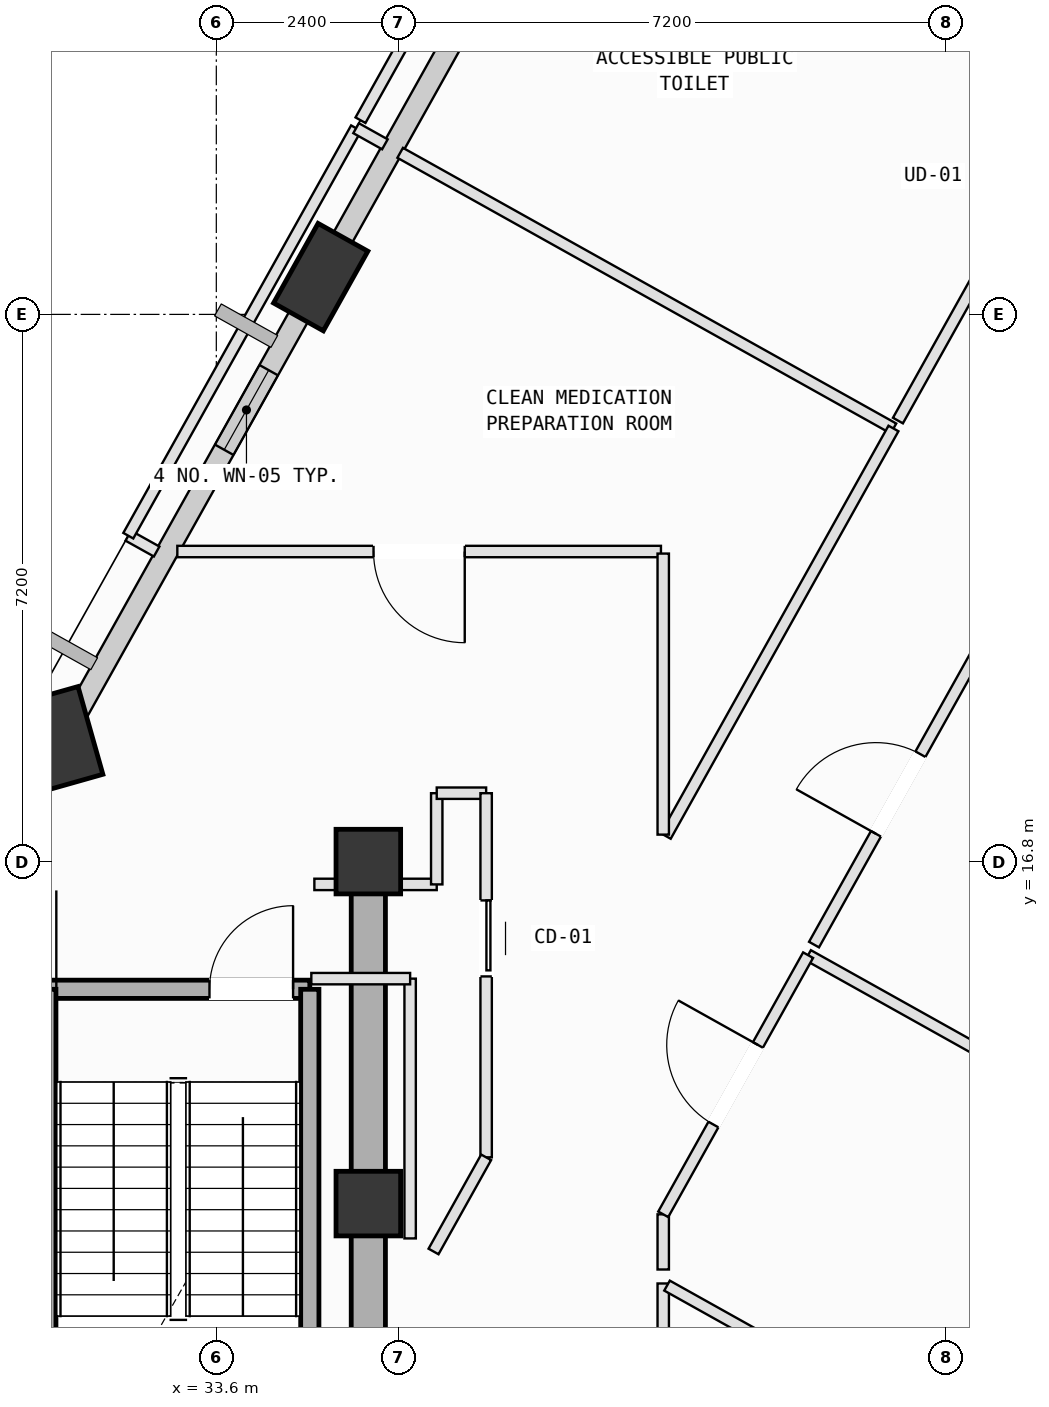
"""IFC4 building model, lengths in metres.
Left out: names, types, materials, properties, quantities, classifications, styles, units other than length and angle.
Written with IfcOpenShell. Run it as: python <this file> out.ifc"""

import sys

from ifc_helpers import new_model, si_unit, direction, frame, frame_2d, origin, origin_2d, place, context, subcontext, project, spatial, rectangle, extrude, element, fill, save


model = new_model("IFC4")
c1 = context("Model", 3, precision=1e-05, world=origin(), true_north=direction((0.0, 1.0)))
c2 = subcontext(c1, "Body", "Model", "MODEL_VIEW")
j1 = project(units=[si_unit("LENGTHUNIT", "METRE"), si_unit("PLANEANGLEUNIT", "RADIAN")], contexts=[c1])
p1 = place(None, origin())
s1 = spatial("IfcSite", under=j1, at=p1, CompositionType="ELEMENT")
p2 = place(p1, origin())
s2 = spatial("IfcBuilding", under=s1, at=p2, CompositionType="ELEMENT")
p3 = place(p2, frame((0.0, 0.0, 284.6)))
s3 = spatial("IfcBuildingStorey", under=s2, at=p3, CompositionType="ELEMENT", Elevation=284.6)
for number, where, z_axis, x_axis in (
    (1, (35.6, 12.3, 0.0), (0.0, 0.0, 1.0), (1.0, 0.0, 0.0)),
    (2, (35.6, 16.8, 0.0), (0.0, 0.0, 1.0), (1.0, 0.0, 0.0)),
):
    element("IfcColumn", number, at=place(p3, frame(where, z_axis=z_axis, x_axis=x_axis)), inside=s3, PredefinedType="COLUMN", context=c2, shape_type="SweptSolid", body=[
        extrude(rectangle(XDim=0.85, YDim=0.85, at=origin_2d()), origin(), (0.0, 0.0, 1.0), 4.0),
    ])
p4 = place(p3, frame((34.974, 24.49, 0.002), z_axis=(0.001221800679, 0.00574246319, 0.999982765511), x_axis=(-0.658837051571, -0.752268219843, 0.005124928444)))
e3 = element("IfcColumn", 3, at=p4, inside=s3, PredefinedType="COLUMN", context=c2, shape_type="SweptSolid", body=[
    extrude(rectangle(XDim=1.2, YDim=0.75, at=origin_2d()), origin(), (0.0, 0.0, 1.0), 3.996),
])
p5 = place(p3, frame((31.583, 18.424, 0.002), z_axis=(0.026503330104, -0.008183055839, 0.999615231522), x_axis=(-0.999365222964, 0.023596653309, 0.026689868551)))
e4 = element("IfcColumn", 4, at=p5, inside=s3, PredefinedType="COLUMN", context=c2, shape_type="SweptSolid", body=[
    extrude(rectangle(XDim=1.2, YDim=0.75, at=origin_2d()), origin(), (0.0, 0.0, 1.0), 3.998),
])
p6 = place(p3, frame((35.173, 24.847, 0.0), z_axis=(0.0, 0.0, 1.0), x_axis=(0.487834163492, 0.872936325817, 0.0)))
e5 = element("IfcWall", 5, at=p6, inside=s3, PredefinedType="SOLIDWALL", context=c2, shape_type="SweptSolid", body=[
    extrude(rectangle(XDim=6.409, YDim=0.28, at=frame_2d((3.205, 0.0))), origin(), (0.0, 0.0, 1.0), 3.265),
])
p7 = place(p6, frame((3.233, 0.0, 0.75)))
e6 = element("IfcOpeningElement", 6, at=p7, cuts=e5, PredefinedType="OPENING", context=c2, shape_type="SweptSolid", body=[
    extrude(rectangle(XDim=1.8, YDim=2.05, at=frame_2d((0.9, 1.025))), frame((0.0, 0.15, 0.0), z_axis=(0.0, -1.0, 0.0), x_axis=(1.0, 0.0, 0.0)), (0.0, 0.0, 1.0), 0.3),
])
p8 = place(p3, frame((31.781, 18.778, 0.0), z_axis=(0.0, 0.0, 1.0), x_axis=(0.487859563913, 0.87292213049, 0.0)))
e7 = element("IfcWall", 7, at=p8, inside=s3, PredefinedType="SOLIDWALL", context=c2, shape_type="SweptSolid", body=[
    extrude(rectangle(XDim=6.158, YDim=0.28, at=frame_2d((3.079, 0.0))), origin(), (0.0, 0.0, 1.0), 3.265),
])
p9 = place(p8, frame((3.942, 0.0, 0.75)))
e8 = element("IfcOpeningElement", 8, at=p9, cuts=e7, PredefinedType="OPENING", context=c2, shape_type="SweptSolid", body=[
    extrude(rectangle(XDim=1.2, YDim=1.75, at=frame_2d((0.6, 0.875))), frame((0.0, 0.15, 0.0), z_axis=(0.0, -1.0, 0.0), x_axis=(1.0, 0.0, 0.0)), (0.0, 0.0, 1.0), 0.3),
])
p10 = place(p3, frame((31.37, 15.12, 0.0), z_axis=(0.0, 0.0, 1.0), x_axis=(1.0, 0.0, 0.0)))
e9 = element("IfcWall", 9, at=p10, inside=s3, PredefinedType="SOLIDWALL", context=c2, shape_type="SweptSolid", body=[
    extrude(rectangle(XDim=3.46, YDim=0.24, at=frame_2d((1.73, 0.0))), origin(), (0.0, 0.0, 1.0), 3.78),
])
p11 = place(p10, frame((2.14, 0.0, 0.0)))
e10 = element("IfcOpeningElement", 10, at=p11, cuts=e9, PredefinedType="OPENING", context=c2, shape_type="SweptSolid", body=[
    extrude(rectangle(XDim=1.1, YDim=2.15, at=frame_2d((0.55, 1.075))), frame((0.0, 0.13, 0.0), z_axis=(0.0, -1.0, 0.0), x_axis=(1.0, 0.0, 0.0)), (0.0, 0.0, 1.0), 0.26),
])
for number, where, z_axis, x_axis in (
    (11, (34.83, 15.12, 0.0), (0.0, 0.0, 1.0), (0.0, -1.0, 0.0)),
    (12, (31.37, 8.025, 0.0), (0.0, 0.0, 1.0), (0.0, 1.0, 0.0)),
):
    element("IfcWall", number, at=place(p3, frame(where, z_axis=z_axis, x_axis=x_axis)), inside=s3, PredefinedType="SOLIDWALL", context=c2, shape_type="SweptSolid", body=[
        extrude(rectangle(XDim=7.095, YDim=0.24, at=frame_2d((3.548, 0.0))), origin(), (0.0, 0.0, 1.0), 3.78),
    ])
p12 = place(p3, frame((35.6, 7.8, 0.0), z_axis=(0.0, 0.0, 1.0), x_axis=(0.0, 1.0, 0.0)))
e13 = element("IfcWall", 13, at=p12, inside=s3, PredefinedType="SHEAR", context=c2, shape_type="SweptSolid", body=[
    extrude(rectangle(XDim=9.0, YDim=0.45, at=frame_2d((4.5, 0.0))), origin(), (0.0, 0.0, 1.0), 3.78),
])
p13 = place(p3, frame((39.48, 6.048, 0.0), z_axis=(0.0, 0.0, 1.0), x_axis=(0.0, 1.0, 0.0)))
e14 = element("IfcWall", 14, at=p13, inside=s3, PredefinedType="PARTITIONING", context=c2, shape_type="SweptSolid", body=[
    extrude(rectangle(XDim=5.201, YDim=0.15, at=frame_2d((2.601, 0.0))), origin(), (0.0, 0.0, 1.0), 3.78),
])
p14 = place(p13, frame((2.0, 0.0, 0.0)))
e15 = element("IfcOpeningElement", 15, at=p14, cuts=e14, PredefinedType="OPENING", context=c2, shape_type="SweptSolid", body=[
    extrude(rectangle(XDim=1.2, YDim=2.15, at=frame_2d((0.6, 1.075))), frame((0.0, 0.085, 0.0), z_axis=(0.0, -1.0, 0.0), x_axis=(1.0, 0.0, 0.0)), (0.0, 0.0, 1.0), 0.17),
])
p15 = place(p3, frame((39.53, 11.221, 0.0), z_axis=(0.0, 0.0, 1.0), x_axis=(0.872948808253, -0.487811826598, 0.0)))
e16 = element("IfcWall", 16, at=p15, inside=s3, PredefinedType="PARTITIONING", context=c2, shape_type="SweptSolid", body=[
    extrude(rectangle(XDim=10.334, YDim=0.15, at=frame_2d((5.167, 0.0))), origin(), (0.0, 0.0, 1.0), 3.78),
])
p16 = place(p3, frame((41.386, 15.569, 0.0), z_axis=(0.0, 0.0, 1.0), x_axis=(0.872874616124, -0.487944571161, 0.0)))
e17 = element("IfcWall", 17, at=p16, inside=s3, PredefinedType="PARTITIONING", context=c2, shape_type="SweptSolid", body=[
    extrude(rectangle(XDim=10.835, YDim=0.15, at=frame_2d((5.418, 0.0))), origin(), (0.0, 0.0, 1.0), 3.78),
])
p17 = place(p3, frame((39.48, 11.433, 0.0), z_axis=(0.0, 0.0, 1.0), x_axis=(0.0, 1.0, 0.0)))
e18 = element("IfcWall", 18, at=p17, inside=s3, PredefinedType="PARTITIONING", context=c2, shape_type="SweptSolid", body=[
    extrude(rectangle(XDim=0.726, YDim=0.15, at=frame_2d((0.363, 0.0))), origin(), (0.0, 0.0, 1.0), 3.315),
])
p18 = place(p3, frame((39.48, 12.159, 0.0), z_axis=(0.0, 0.0, 1.0), x_axis=(0.487885785895, 0.872907475006, 0.0)))
e19 = element("IfcWall", 19, at=p18, inside=s3, PredefinedType="PARTITIONING", context=c2, shape_type="SweptSolid", body=[
    extrude(rectangle(XDim=3.907, YDim=0.15, at=frame_2d((1.953, 0.0))), origin(), (0.0, 0.0, 1.0), 3.78),
])
p19 = place(p18, frame((1.353, 0.0, 0.0)))
e20 = element("IfcOpeningElement", 20, at=p19, cuts=e19, PredefinedType="OPENING", context=c2, shape_type="SweptSolid", body=[
    extrude(rectangle(XDim=1.2, YDim=2.15, at=frame_2d((0.6, 1.075))), frame((0.0, 0.085, 0.0), z_axis=(0.0, -1.0, 0.0), x_axis=(1.0, 0.0, 0.0)), (0.0, 0.0, 1.0), 0.17),
])
p20 = place(p3, frame((41.464, 15.708, 0.0), z_axis=(0.0, 0.0, 1.0), x_axis=(0.487869568795, 0.872916538876, 0.0)))
e21 = element("IfcWall", 21, at=p20, inside=s3, PredefinedType="PARTITIONING", context=c2, shape_type="SweptSolid", body=[
    extrude(rectangle(XDim=4.54, YDim=0.15, at=frame_2d((2.27, 0.0))), origin(), (0.0, 0.0, 1.0), 3.78),
])
p21 = place(p20, frame((1.67, 0.0, 0.0)))
e22 = element("IfcOpeningElement", 22, at=p21, cuts=e21, PredefinedType="OPENING", context=c2, shape_type="SweptSolid", body=[
    extrude(rectangle(XDim=1.2, YDim=2.15, at=frame_2d((0.6, 1.075))), frame((0.0, 0.085, 0.0), z_axis=(0.0, -1.0, 0.0), x_axis=(1.0, 0.0, 0.0)), (0.0, 0.0, 1.0), 0.17),
])
p22 = place(p3, frame((34.89, 16.5, 0.0), z_axis=(0.0, 0.0, 1.0), x_axis=(1.0, 0.0, 0.0)))
e23 = element("IfcWall", 23, at=p22, inside=s3, PredefinedType="PARTITIONING", context=c2, shape_type="SweptSolid", body=[
    extrude(rectangle(XDim=1.61, YDim=0.15, at=frame_2d((0.805, 0.0))), origin(), (0.0, 0.0, 1.0), 3.165),
])
p23 = place(p3, frame((36.5, 16.5, 0.0), z_axis=(0.0, 0.0, 1.0), x_axis=(0.0, 1.0, 0.0)))
e24 = element("IfcWall", 24, at=p23, inside=s3, PredefinedType="PARTITIONING", context=c2, shape_type="SweptSolid", body=[
    extrude(rectangle(XDim=1.2, YDim=0.15, at=frame_2d((0.6, 0.0))), origin(), (0.0, 0.0, 1.0), 3.78),
])
p24 = place(p3, frame((36.5, 17.7, 0.0), z_axis=(0.0, 0.0, 1.0), x_axis=(1.0, 0.0, 0.0)))
e25 = element("IfcWall", 25, at=p24, inside=s3, PredefinedType="PARTITIONING", context=c2, shape_type="SweptSolid", body=[
    extrude(rectangle(XDim=0.65, YDim=0.15, at=frame_2d((0.325, 0.0))), origin(), (0.0, 0.0, 1.0), 3.78),
])
p25 = place(p3, frame((37.15, 17.7, 0.0), z_axis=(0.0, 0.0, 1.0), x_axis=(0.0, -1.0, 0.0)))
e26 = element("IfcWall", 26, at=p25, inside=s3, PredefinedType="PARTITIONING", context=c2, shape_type="SweptSolid", body=[
    extrude(rectangle(XDim=4.791, YDim=0.15, at=frame_2d((2.396, 0.0))), origin(), (0.0, 0.0, 1.0), 3.78),
])
p26 = place(p25, frame((1.411, 0.0, 0.0)))
e27 = element("IfcOpeningElement", 27, at=p26, cuts=e26, PredefinedType="OPENING", context=c2, shape_type="SweptSolid", body=[
    extrude(rectangle(XDim=1.0, YDim=2.12, at=frame_2d((0.5, 1.06))), frame((0.0, 0.085, 0.0), z_axis=(0.0, -1.0, 0.0), x_axis=(1.0, 0.0, 0.0)), (0.0, 0.0, 1.0), 0.17),
])
p27 = place(p3, frame((37.15, 12.909, 0.0), z_axis=(0.0, 0.0, 1.0), x_axis=(-0.487555283058, -0.873092117684, 0.0)))
e28 = element("IfcWall", 28, at=p27, inside=s3, PredefinedType="PARTITIONING", context=c2, shape_type="SweptSolid", body=[
    extrude(rectangle(XDim=1.419, YDim=0.15, at=frame_2d((0.709, 0.0))), origin(), (0.0, 0.0, 1.0), 3.78),
])
p28 = place(p3, frame((36.15, 11.842, 0.0), z_axis=(0.0, 0.0, 1.0), x_axis=(0.0, 1.0, 0.0)))
e29 = element("IfcWall", 29, at=p28, inside=s3, PredefinedType="PARTITIONING", context=c2, shape_type="SweptSolid", body=[
    extrude(rectangle(XDim=3.418, YDim=0.15, at=frame_2d((1.709, 0.0))), origin(), (0.0, 0.0, 1.0), 3.78),
])
p29 = place(p3, frame((36.15, 15.26, 0.0), z_axis=(0.0, 0.0, 1.0), x_axis=(-1.0, 0.0, 0.0)))
e30 = element("IfcWall", 30, at=p29, inside=s3, PredefinedType="PARTITIONING", context=c2, shape_type="SweptSolid", body=[
    extrude(rectangle(XDim=1.3, YDim=0.15, at=frame_2d((0.65, 0.0))), origin(), (0.0, 0.0, 1.0), 3.78),
])
p30 = place(p3, frame((39.45, 20.88, 0.0), z_axis=(0.0, 0.0, 1.0), x_axis=(-1.0, 0.0, 0.0)))
e31 = element("IfcWall", 31, at=p30, inside=s3, PredefinedType="PARTITIONING", context=c2, shape_type="SweptSolid", body=[
    extrude(rectangle(XDim=6.363, YDim=0.15, at=frame_2d((3.182, 0.0))), origin(), (0.0, 0.0, 1.0), 3.415),
])
p31 = place(p30, frame((2.582, 0.0, 0.0)))
e32 = element("IfcOpeningElement", 32, at=p31, cuts=e31, PredefinedType="OPENING", context=c2, shape_type="SweptSolid", body=[
    extrude(rectangle(XDim=1.2, YDim=2.15, at=frame_2d((0.6, 1.075))), frame((0.0, 0.085, 0.0), z_axis=(0.0, -1.0, 0.0), x_axis=(1.0, 0.0, 0.0)), (0.0, 0.0, 1.0), 0.17),
])
p32 = place(p3, frame((32.815, 20.88, 0.0), z_axis=(0.0, 0.0, 1.0), x_axis=(-0.873401279557, 0.48700123703, 0.0)))
e33 = element("IfcWall", 33, at=p32, inside=s3, PredefinedType="PARTITIONING", context=c2, shape_type="SweptSolid", body=[
    extrude(rectangle(XDim=0.427, YDim=0.15, at=frame_2d((0.213, 0.0))), origin(), (0.0, 0.0, 1.0), 3.78),
])
p33 = place(p3, frame((32.442, 21.088, 0.0), z_axis=(0.0, 0.0, 1.0), x_axis=(0.487898852852, 0.872900171489, 0.0)))
e34 = element("IfcWall", 34, at=p33, inside=s3, PredefinedType="PARTITIONING", context=c2, shape_type="SweptSolid", body=[
    extrude(rectangle(XDim=6.143, YDim=0.15, at=frame_2d((3.071, 0.0))), origin(), (0.0, 0.0, 1.0), 3.78),
])
p34 = place(p3, frame((35.439, 26.45, 0.0), z_axis=(0.0, 0.0, 1.0), x_axis=(0.872908280471, -0.487884344784, 0.0)))
e35 = element("IfcWall", 35, at=p34, inside=s3, PredefinedType="PARTITIONING", context=c2, shape_type="SweptSolid", body=[
    extrude(rectangle(XDim=0.434, YDim=0.15, at=frame_2d((0.217, 0.0))), origin(), (0.0, 0.0, 1.0), 3.78),
])
p35 = place(p3, frame((36.019, 26.126, 0.0), z_axis=(0.0, 0.0, 1.0), x_axis=(0.872932377171, -0.487841229179, 0.0)))
e36 = element("IfcWall", 36, at=p35, inside=s3, PredefinedType="PARTITIONING", context=c2, shape_type="SweptSolid", body=[
    extrude(rectangle(XDim=7.435, YDim=0.15, at=frame_2d((3.717, 0.0))), origin(), (0.0, 0.0, 1.0), 3.78),
])
p36 = place(p3, frame((42.509, 22.499, 0.0), z_axis=(0.0, 0.0, 1.0), x_axis=(-0.487777705872, -0.872967874354, 0.0)))
e37 = element("IfcWall", 37, at=p36, inside=s3, PredefinedType="PARTITIONING", context=c2, shape_type="SweptSolid", body=[
    extrude(rectangle(XDim=6.142, YDim=0.15, at=frame_2d((3.071, 0.0))), origin(), (0.0, 0.0, 1.0), 3.78),
])
p37 = place(p3, frame((39.48, 17.155, 0.0), z_axis=(0.0, 0.0, 1.0), x_axis=(0.0, 1.0, 0.0)))
e38 = element("IfcWall", 38, at=p37, inside=s3, PredefinedType="PARTITIONING", context=c2, shape_type="SweptSolid", body=[
    extrude(rectangle(XDim=3.698, YDim=0.15, at=frame_2d((1.849, 0.0))), origin(), (0.0, 0.0, 1.0), 3.78),
])
p38 = place(p3, frame((45.725, 28.253, 0.0), z_axis=(0.0, 0.0, 1.0), x_axis=(-0.487784157337, -0.872964269515, 0.0)))
e39 = element("IfcWall", 39, at=p38, inside=s3, PredefinedType="PARTITIONING", context=c2, shape_type="SweptSolid", body=[
    extrude(rectangle(XDim=6.472, YDim=0.15, at=frame_2d((3.236, 0.0))), origin(), (0.0, 0.0, 1.0), 3.78),
])
p39 = place(p38, frame((2.776, 0.0, 0.0)))
e40 = element("IfcOpeningElement", 40, at=p39, cuts=e39, PredefinedType="OPENING", context=c2, shape_type="SweptSolid", body=[
    extrude(rectangle(XDim=0.92, YDim=2.1, at=frame_2d((0.46, 1.05))), frame((0.0, 0.085, 0.0), z_axis=(0.0, -1.0, 0.0), x_axis=(1.0, 0.0, 0.0)), (0.0, 0.0, 1.0), 0.17),
])
p40 = place(p3, frame((35.497, 26.555, 0.0), z_axis=(0.0, 0.0, 1.0), x_axis=(0.487883067862, 0.872908994165, 0.0)))
e41 = element("IfcWall", 41, at=p40, inside=s3, PredefinedType="PARTITIONING", context=c2, shape_type="SweptSolid", body=[
    extrude(rectangle(XDim=6.473, YDim=0.15, at=frame_2d((3.236, 0.0))), origin(), (0.0, 0.0, 1.0), 3.265),
])
p41 = place(p9, origin())
e42 = element("IfcWindow", 42, at=p41, inside=s3, PartitioningType="SINGLE_PANEL", PredefinedType="WINDOW", context=c2, shape_type="SweptSolid", body=[
    extrude(rectangle(XDim=1.2, YDim=1.75, at=frame_2d((0.6, 0.875))), frame((0.0, 0.03, 0.0), z_axis=(0.0, -1.0, 0.0), x_axis=(1.0, 0.0, 0.0)), (0.0, 0.0, 1.0), 0.06),
])
fill(e8, e42)
p42 = place(p11, origin())
e43 = element("IfcDoor", 43, at=p42, inside=s3, OperationType="SINGLE_SWING_RIGHT", PredefinedType="DOOR", context=c2, shape_type="SweptSolid", body=[
    extrude(rectangle(XDim=1.1, YDim=2.15, at=frame_2d((0.55, 1.075))), frame((0.0, 0.025, 0.0), z_axis=(0.0, -1.0, 0.0), x_axis=(1.0, 0.0, 0.0)), (0.0, 0.0, 1.0), 0.05),
])
fill(e10, e43)
p43 = place(p19, origin())
e44 = element("IfcDoor", 44, at=p43, inside=s3, OperationType="SINGLE_SWING_RIGHT", PredefinedType="DOOR", context=c2, shape_type="SweptSolid", body=[
    extrude(rectangle(XDim=1.2, YDim=2.15, at=frame_2d((0.6, 1.075))), frame((0.0, 0.025, 0.0), z_axis=(0.0, -1.0, 0.0), x_axis=(1.0, 0.0, 0.0)), (0.0, 0.0, 1.0), 0.05),
])
fill(e20, e44)
p44 = place(p21, origin())
e45 = element("IfcDoor", 45, at=p44, inside=s3, OperationType="SINGLE_SWING_LEFT", PredefinedType="DOOR", context=c2, shape_type="SweptSolid", body=[
    extrude(rectangle(XDim=1.2, YDim=2.15, at=frame_2d((0.6, 1.075))), frame((0.0, 0.025, 0.0), z_axis=(0.0, -1.0, 0.0), x_axis=(1.0, 0.0, 0.0)), (0.0, 0.0, 1.0), 0.05),
])
fill(e22, e45)
p45 = place(p26, origin())
e46 = element("IfcDoor", 46, at=p45, inside=s3, OperationType="SLIDING_TO_LEFT", PredefinedType="DOOR", context=c2, shape_type="SweptSolid", body=[
    extrude(rectangle(XDim=1.0, YDim=2.12, at=frame_2d((0.5, 1.06))), frame((0.0, 0.025, 0.0), z_axis=(0.0, -1.0, 0.0), x_axis=(1.0, 0.0, 0.0)), (0.0, 0.0, 1.0), 0.05),
])
fill(e27, e46)
p46 = place(p31, origin())
e47 = element("IfcDoor", 47, at=p46, inside=s3, OperationType="SINGLE_SWING_LEFT", PredefinedType="DOOR", context=c2, shape_type="SweptSolid", body=[
    extrude(rectangle(XDim=1.2, YDim=2.15, at=frame_2d((0.6, 1.075))), frame((0.0, 0.025, 0.0), z_axis=(0.0, -1.0, 0.0), x_axis=(1.0, 0.0, 0.0)), (0.0, 0.0, 1.0), 0.05),
])
fill(e32, e47)
save(model, sys.argv[1])
